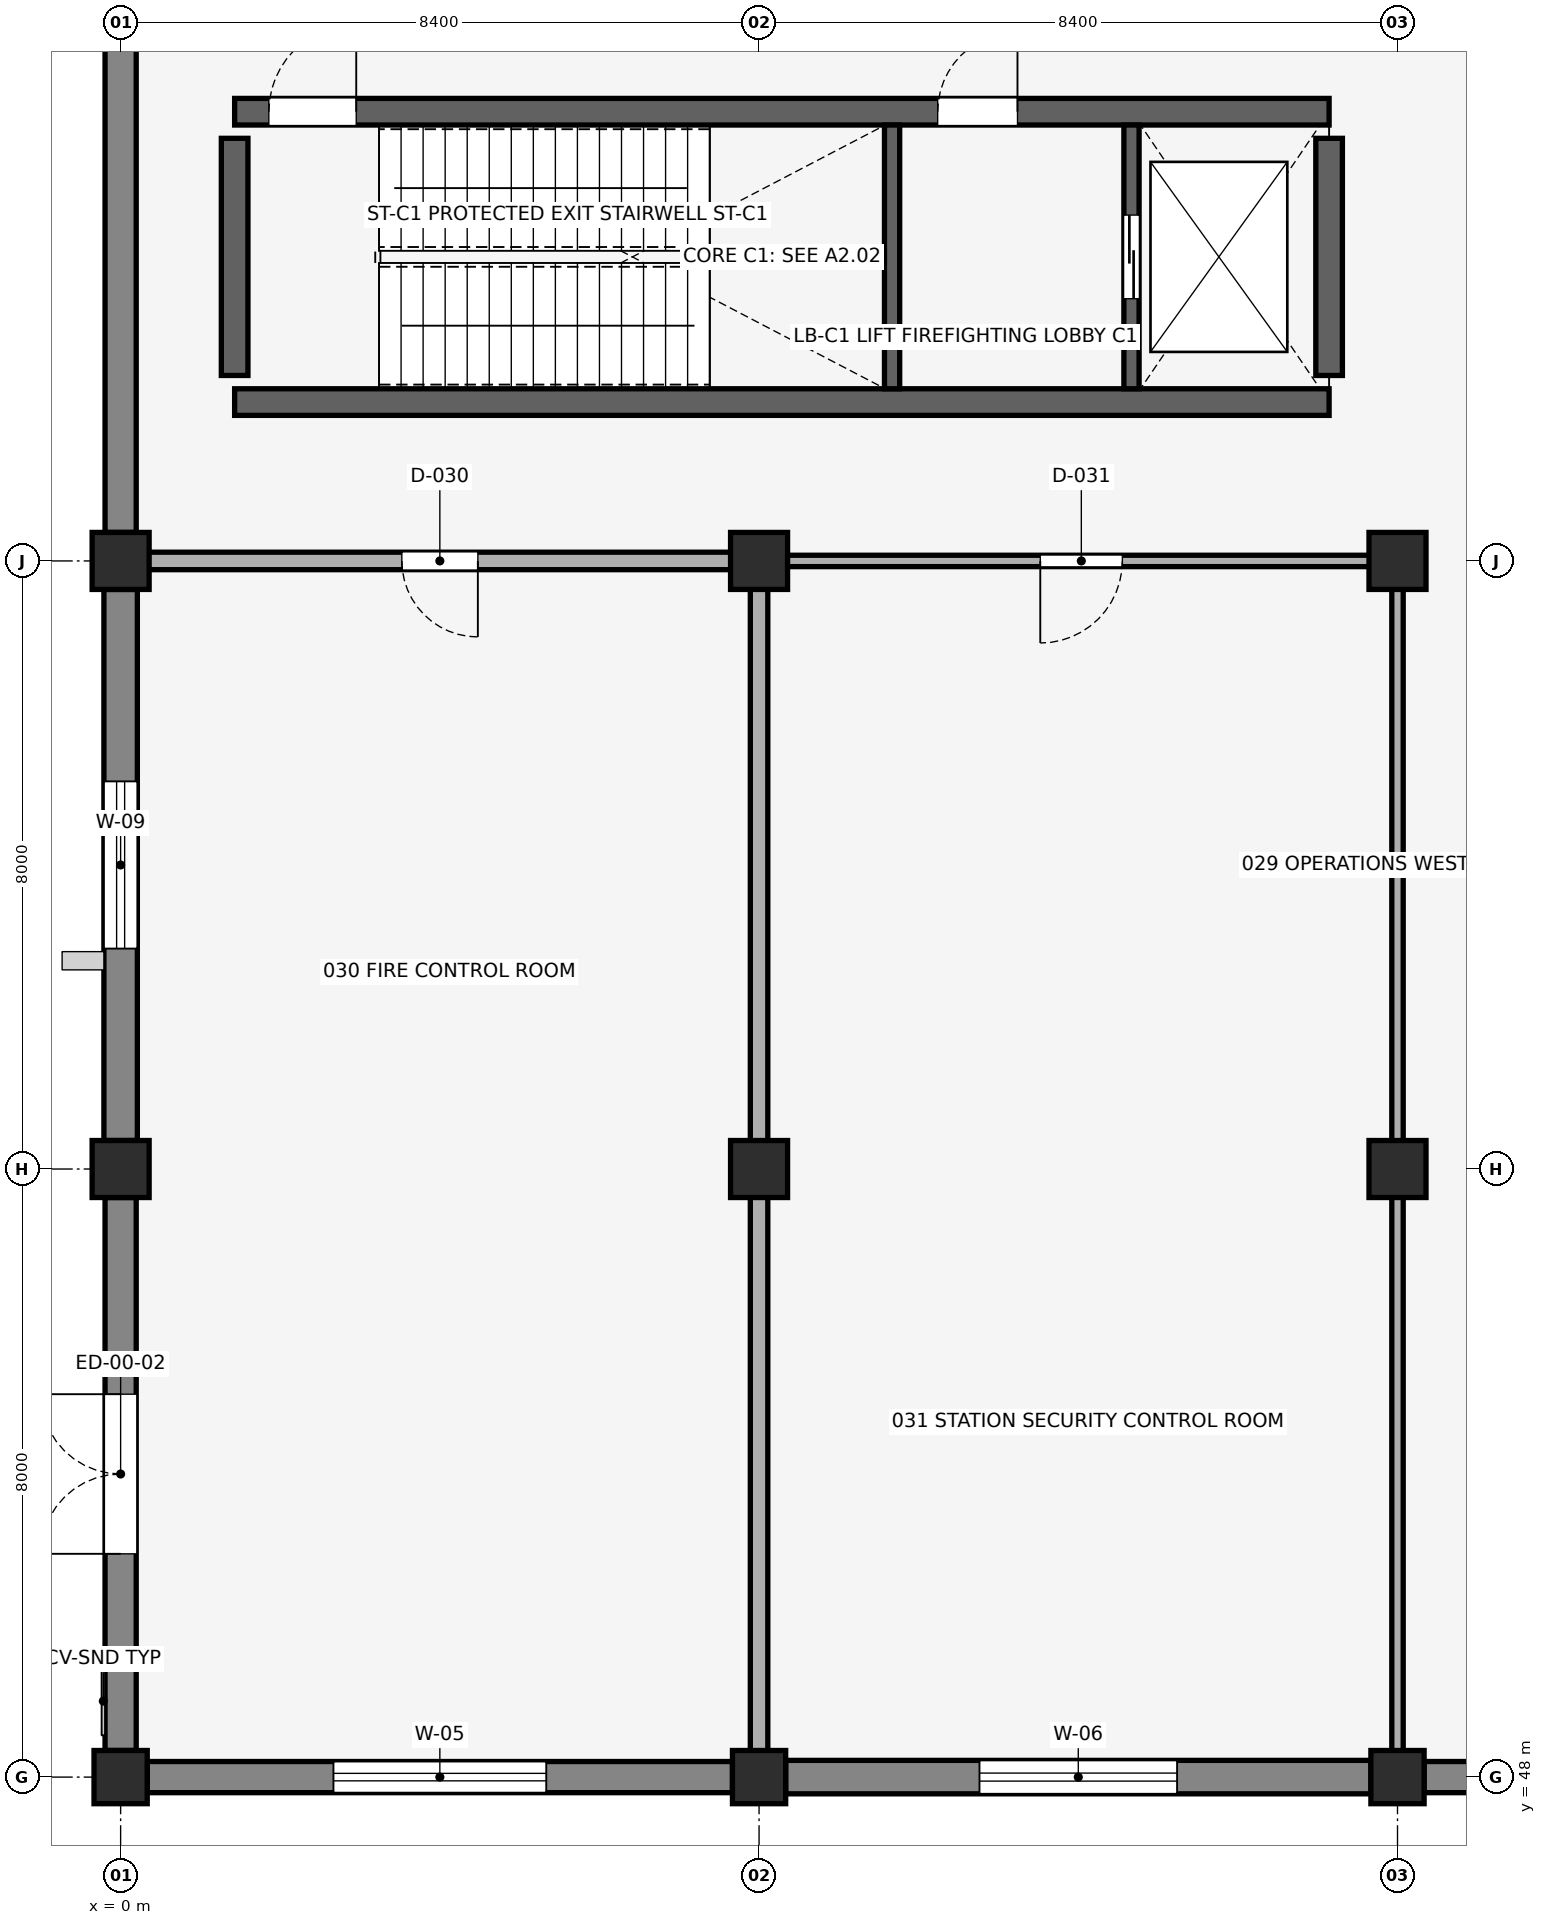
"""IFC4 building model, lengths in metres.
Left out: names, types, materials, properties, quantities, classifications, styles, units other than length and angle.
Written with IfcOpenShell. Run it as: python <this file> out.ifc"""

import sys

from ifc_helpers import new_model, si_unit, direction, frame, frame_2d, origin, origin_2d, place, context, subcontext, project, spatial, rectangle, extrude, element, fill, save


model = new_model("IFC4")
c1 = context("Model", 3, precision=1e-05, world=origin(), true_north=direction((0.0, 1.0)))
c2 = subcontext(c1, "Body", "Model", "MODEL_VIEW")
j1 = project(units=[si_unit("LENGTHUNIT", "METRE"), si_unit("PLANEANGLEUNIT", "RADIAN")], contexts=[c1])
p1 = place(None, origin())
s1 = spatial("IfcSite", under=j1, at=p1, CompositionType="ELEMENT")
p2 = place(p1, origin())
s2 = spatial("IfcBuilding", under=s1, at=p2, CompositionType="ELEMENT")
p3 = place(p2, origin())
s3 = spatial("IfcBuildingStorey", under=s2, at=p3, CompositionType="ELEMENT", Elevation=0.0)
p4 = place(p3, frame((1.5, 66.09, 0.0), z_axis=(0.0, 0.0, 1.0), x_axis=(1.0, 0.0, 0.0)))
e1 = element("IfcWall", 1, at=p4, inside=s3, PredefinedType="SHEAR", context=c2, shape_type="SweptSolid", body=[
    extrude(rectangle(XDim=14.4, YDim=0.35, at=frame_2d((7.2, 0.0))), origin(), (0.0, 0.0, 1.0), 5.15),
])
p5 = place(p3, frame((1.5, 69.91, 0.0), z_axis=(0.0, 0.0, 1.0), x_axis=(1.0, 0.0, 0.0)))
e2 = element("IfcWall", 2, at=p5, inside=s3, PredefinedType="SHEAR", context=c2, shape_type="SweptSolid", body=[
    extrude(rectangle(XDim=14.4, YDim=0.35, at=frame_2d((7.2, 0.0))), origin(), (0.0, 0.0, 1.0), 5.15),
])
p6 = place(p5, frame((0.45, 0.0, 0.0), z_axis=(0.0, 0.0, 1.0), x_axis=(1.0, 0.0, 0.0)))
e3 = element("IfcOpeningElement", 3, at=p6, cuts=e2, PredefinedType="OPENING", context=c2, shape_type="SweptSolid", body=[
    extrude(rectangle(XDim=1.15, YDim=2.15, at=frame_2d((0.575, 1.075))), frame((0.0, 0.185, 0.0), z_axis=(0.0, -1.0, 0.0), x_axis=(1.0, 0.0, 0.0)), (0.0, 0.0, 1.0), 0.37),
])
p7 = place(p5, frame((9.25, 0.0, 0.0), z_axis=(0.0, 0.0, 1.0), x_axis=(1.0, 0.0, 0.0)))
e4 = element("IfcOpeningElement", 4, at=p7, cuts=e2, PredefinedType="OPENING", context=c2, shape_type="SweptSolid", body=[
    extrude(rectangle(XDim=1.05, YDim=2.15, at=frame_2d((0.525, 1.075))), frame((0.0, 0.185, 0.0), z_axis=(0.0, -1.0, 0.0), x_axis=(1.0, 0.0, 0.0)), (0.0, 0.0, 1.0), 0.37),
])
for number, where, z_axis, x_axis in (
    (5, (1.5, 66.44, 0.0), (0.0, 0.0, 1.0), (0.0, 1.0, 0.0)),
    (6, (15.9, 66.44, 0.0), (0.0, 0.0, 1.0), (0.0, 1.0, 0.0)),
):
    element("IfcWall", number, at=place(p3, frame(where, z_axis=z_axis, x_axis=x_axis)), inside=s3, PredefinedType="SHEAR", context=c2, shape_type="SweptSolid", body=[
        extrude(rectangle(XDim=3.12, YDim=0.35, at=frame_2d((1.56, 0.0))), origin(), (0.0, 0.0, 1.0), 5.15),
    ])
p8 = place(p3, frame((0.0, 48.0, 0.0), z_axis=(0.0, 0.0, 1.0), x_axis=(1.0, 0.0, 0.0)))
e7 = element("IfcColumn", 7, at=p8, inside=s3, PredefinedType="COLUMN", context=c2, shape_type="SweptSolid", body=[
    extrude(rectangle(XDim=0.7, YDim=0.7, at=origin_2d()), origin(), (0.0, 0.0, 1.0), 5.15),
])
for number, where, z_axis, x_axis in (
    (8, (0.0, 56.0, 0.0), (0.0, 0.0, 1.0), (1.0, 0.0, 0.0)),
    (9, (0.0, 64.0, 0.0), (0.0, 0.0, 1.0), (1.0, 0.0, 0.0)),
):
    element("IfcColumn", number, at=place(p3, frame(where, z_axis=z_axis, x_axis=x_axis)), inside=s3, PredefinedType="COLUMN", context=c2, shape_type="SweptSolid", body=[
        extrude(rectangle(XDim=0.75, YDim=0.75, at=origin_2d()), origin(), (0.0, 0.0, 1.0), 5.15),
    ])
p9 = place(p3, frame((8.4, 48.0, 0.0), z_axis=(0.0, 0.0, 1.0), x_axis=(1.0, 0.0, 0.0)))
e10 = element("IfcColumn", 10, at=p9, inside=s3, PredefinedType="COLUMN", context=c2, shape_type="SweptSolid", body=[
    extrude(rectangle(XDim=0.7, YDim=0.7, at=origin_2d()), origin(), (0.0, 0.0, 1.0), 5.15),
])
for number, where, z_axis, x_axis in (
    (11, (8.4, 56.0, 0.0), (0.0, 0.0, 1.0), (1.0, 0.0, 0.0)),
    (12, (8.4, 64.0, 0.0), (0.0, 0.0, 1.0), (1.0, 0.0, 0.0)),
):
    element("IfcColumn", number, at=place(p3, frame(where, z_axis=z_axis, x_axis=x_axis)), inside=s3, PredefinedType="COLUMN", context=c2, shape_type="SweptSolid", body=[
        extrude(rectangle(XDim=0.75, YDim=0.75, at=origin_2d()), origin(), (0.0, 0.0, 1.0), 5.15),
    ])
p10 = place(p3, frame((16.8, 48.0, 0.0), z_axis=(0.0, 0.0, 1.0), x_axis=(1.0, 0.0, 0.0)))
e13 = element("IfcColumn", 13, at=p10, inside=s3, PredefinedType="COLUMN", context=c2, shape_type="SweptSolid", body=[
    extrude(rectangle(XDim=0.7, YDim=0.7, at=origin_2d()), origin(), (0.0, 0.0, 1.0), 5.15),
])
for number, where, z_axis, x_axis in (
    (14, (16.8, 56.0, 0.0), (0.0, 0.0, 1.0), (1.0, 0.0, 0.0)),
    (15, (16.8, 64.0, 0.0), (0.0, 0.0, 1.0), (1.0, 0.0, 0.0)),
):
    element("IfcColumn", number, at=place(p3, frame(where, z_axis=z_axis, x_axis=x_axis)), inside=s3, PredefinedType="COLUMN", context=c2, shape_type="SweptSolid", body=[
        extrude(rectangle(XDim=0.75, YDim=0.75, at=origin_2d()), origin(), (0.0, 0.0, 1.0), 5.15),
    ])
p11 = place(p3, frame((0.35, 48.0, 0.0), z_axis=(0.0, 0.0, 1.0), x_axis=(1.0, 0.0, 0.0)))
e16 = element("IfcWall", 16, at=p11, inside=s3, PredefinedType="SOLIDWALL", context=c2, shape_type="SweptSolid", body=[
    extrude(rectangle(XDim=7.7, YDim=0.41, at=frame_2d((3.85, 0.0))), origin(), (0.0, 0.0, 1.0), 4.74),
])
p12 = place(p11, frame((2.45, 0.0, 0.9), z_axis=(0.0, 0.0, 1.0), x_axis=(1.0, 0.0, 0.0)))
e17 = element("IfcOpeningElement", 17, at=p12, cuts=e16, PredefinedType="OPENING", context=c2, shape_type="SweptSolid", body=[
    extrude(rectangle(XDim=2.8, YDim=1.6, at=frame_2d((1.4, 0.8))), frame((0.0, 0.215, 0.0), z_axis=(0.0, -1.0, 0.0), x_axis=(1.0, 0.0, 0.0)), (0.0, 0.0, 1.0), 0.43),
])
p13 = place(p3, frame((8.75, 48.0, 0.0), z_axis=(0.0, 0.0, 1.0), x_axis=(1.0, 0.0, 0.0)))
e18 = element("IfcWall", 18, at=p13, inside=s3, PredefinedType="SOLIDWALL", context=c2, shape_type="SweptSolid", body=[
    extrude(rectangle(XDim=7.7, YDim=0.44, at=frame_2d((3.85, 0.0))), origin(), (0.0, 0.0, 1.0), 4.74),
])
p14 = place(p13, frame((2.55, 0.0, 0.9), z_axis=(0.0, 0.0, 1.0), x_axis=(1.0, 0.0, 0.0)))
e19 = element("IfcOpeningElement", 19, at=p14, cuts=e18, PredefinedType="OPENING", context=c2, shape_type="SweptSolid", body=[
    extrude(rectangle(XDim=2.6, YDim=1.8, at=frame_2d((1.3, 0.9))), frame((0.0, 0.23, 0.0), z_axis=(0.0, -1.0, 0.0), x_axis=(1.0, 0.0, 0.0)), (0.0, 0.0, 1.0), 0.46),
])
p15 = place(p3, frame((17.15, 48.0, 0.0), z_axis=(0.0, 0.0, 1.0), x_axis=(1.0, 0.0, 0.0)))
e20 = element("IfcWall", 20, at=p15, inside=s3, PredefinedType="SOLIDWALL", context=c2, shape_type="SweptSolid", body=[
    extrude(rectangle(XDim=7.7, YDim=0.41, at=frame_2d((3.85, 0.0))), origin(), (0.0, 0.0, 1.0), 4.74),
])
p16 = place(p15, frame((2.65, 0.0, 0.9), z_axis=(0.0, 0.0, 1.0), x_axis=(1.0, 0.0, 0.0)))
e21 = element("IfcOpeningElement", 21, at=p16, cuts=e20, PredefinedType="OPENING", context=c2, shape_type="SweptSolid", body=[
    extrude(rectangle(XDim=2.4, YDim=1.75, at=frame_2d((1.2, 0.875))), frame((0.0, 0.215, 0.0), z_axis=(0.0, -1.0, 0.0), x_axis=(1.0, 0.0, 0.0)), (0.0, 0.0, 1.0), 0.43),
])
p17 = place(p3, frame((0.0, 48.35, 0.0), z_axis=(0.0, 0.0, 1.0), x_axis=(0.0, 1.0, 0.0)))
e22 = element("IfcWall", 22, at=p17, inside=s3, PredefinedType="SOLIDWALL", context=c2, shape_type="SweptSolid", body=[
    extrude(rectangle(XDim=7.275, YDim=0.41, at=frame_2d((3.637, 0.0))), origin(), (0.0, 0.0, 1.0), 4.747),
])
p18 = place(p17, frame((2.587, 0.0, 0.0), z_axis=(0.0, 0.0, 1.0), x_axis=(1.0, 0.0, 0.0)))
e23 = element("IfcOpeningElement", 23, at=p18, cuts=e22, PredefinedType="OPENING", context=c2, shape_type="SweptSolid", body=[
    extrude(rectangle(XDim=2.1, YDim=2.45, at=frame_2d((1.05, 1.225))), frame((0.0, 0.215, 0.0), z_axis=(0.0, -1.0, 0.0), x_axis=(1.0, 0.0, 0.0)), (0.0, 0.0, 1.0), 0.43),
])
p19 = place(p3, frame((0.0, 56.375, 0.0), z_axis=(0.0, 0.0, 1.0), x_axis=(0.0, 1.0, 0.0)))
e24 = element("IfcWall", 24, at=p19, inside=s3, PredefinedType="SOLIDWALL", context=c2, shape_type="SweptSolid", body=[
    extrude(rectangle(XDim=7.25, YDim=0.44, at=frame_2d((3.625, 0.0))), origin(), (0.0, 0.0, 1.0), 4.747),
])
p20 = place(p19, frame((2.525, 0.0, 0.9), z_axis=(0.0, 0.0, 1.0), x_axis=(1.0, 0.0, 0.0)))
e25 = element("IfcOpeningElement", 25, at=p20, cuts=e24, PredefinedType="OPENING", context=c2, shape_type="SweptSolid", body=[
    extrude(rectangle(XDim=2.2, YDim=1.5, at=frame_2d((1.1, 0.75))), frame((0.0, 0.23, 0.0), z_axis=(0.0, -1.0, 0.0), x_axis=(1.0, 0.0, 0.0)), (0.0, 0.0, 1.0), 0.46),
])
p21 = place(p3, frame((0.0, 64.375, 0.0), z_axis=(0.0, 0.0, 1.0), x_axis=(0.0, 1.0, 0.0)))
e26 = element("IfcWall", 26, at=p21, inside=s3, PredefinedType="SOLIDWALL", context=c2, shape_type="SweptSolid", body=[
    extrude(rectangle(XDim=7.25, YDim=0.41, at=frame_2d((3.625, 0.0))), origin(), (0.0, 0.0, 1.0), 4.85),
])
p22 = place(p3, frame((10.15, 66.265, 0.0), z_axis=(0.0, 0.0, 1.0), x_axis=(0.0, 1.0, 0.0)))
e27 = element("IfcWall", 27, at=p22, inside=s3, PredefinedType="SHEAR", context=c2, shape_type="SweptSolid", body=[
    extrude(rectangle(XDim=3.47, YDim=0.2, at=frame_2d((1.735, 0.0))), origin(), (0.0, 0.0, 1.0), 5.15),
])
p23 = place(p3, frame((13.3, 66.265, 0.0), z_axis=(0.0, 0.0, 1.0), x_axis=(0.0, 1.0, 0.0)))
e28 = element("IfcWall", 28, at=p23, inside=s3, PredefinedType="SHEAR", context=c2, shape_type="SweptSolid", body=[
    extrude(rectangle(XDim=3.47, YDim=0.2, at=frame_2d((1.735, 0.0))), origin(), (0.0, 0.0, 1.0), 5.15),
])
p24 = place(p23, frame((1.185, 0.0, 0.0), z_axis=(0.0, 0.0, 1.0), x_axis=(1.0, 0.0, 0.0)))
e29 = element("IfcOpeningElement", 29, at=p24, cuts=e28, PredefinedType="OPENING", context=c2, shape_type="SweptSolid", body=[
    extrude(rectangle(XDim=1.1, YDim=2.15, at=frame_2d((0.55, 1.075))), frame((0.0, 0.11, 0.0), z_axis=(0.0, -1.0, 0.0), x_axis=(1.0, 0.0, 0.0)), (0.0, 0.0, 1.0), 0.22),
])
p25 = place(p3, frame((0.365, 64.0, 0.0), z_axis=(0.0, 0.0, 1.0), x_axis=(1.0, 0.0, 0.0)))
e30 = element("IfcWall", 30, at=p25, inside=s3, PredefinedType="PARTITIONING", context=c2, shape_type="SweptSolid", body=[
    extrude(rectangle(XDim=7.67, YDim=0.23, at=frame_2d((3.835, 0.0))), origin(), (0.0, 0.0, 1.0), 4.605),
])
p26 = place(p25, frame((4.335, 0.0, 0.0), z_axis=(0.0, 0.0, 1.0), x_axis=(-1.0, 0.0, 0.0)))
e31 = element("IfcOpeningElement", 31, at=p26, cuts=e30, PredefinedType="OPENING", context=c2, shape_type="SweptSolid", body=[
    extrude(rectangle(XDim=1.0, YDim=2.15, at=frame_2d((0.5, 1.075))), frame((0.0, 0.125, 0.0), z_axis=(0.0, -1.0, 0.0), x_axis=(1.0, 0.0, 0.0)), (0.0, 0.0, 1.0), 0.25),
])
p27 = place(p3, frame((8.765, 64.0, 0.0), z_axis=(0.0, 0.0, 1.0), x_axis=(1.0, 0.0, 0.0)))
e32 = element("IfcWall", 32, at=p27, inside=s3, PredefinedType="PARTITIONING", context=c2, shape_type="SweptSolid", body=[
    extrude(rectangle(XDim=7.67, YDim=0.15, at=frame_2d((3.835, 0.0))), origin(), (0.0, 0.0, 1.0), 4.605),
])
p28 = place(p27, frame((4.415, 0.0, 0.0), z_axis=(0.0, 0.0, 1.0), x_axis=(-1.0, 0.0, 0.0)))
e33 = element("IfcOpeningElement", 33, at=p28, cuts=e32, PredefinedType="OPENING", context=c2, shape_type="SweptSolid", body=[
    extrude(rectangle(XDim=1.08, YDim=2.18, at=frame_2d((0.54, 1.09))), frame((0.0, 0.085, 0.0), z_axis=(0.0, -1.0, 0.0), x_axis=(1.0, 0.0, 0.0)), (0.0, 0.0, 1.0), 0.17),
])
p29 = place(p3, frame((8.4, 48.34, 0.0), z_axis=(0.0, 0.0, 1.0), x_axis=(0.0, 1.0, 0.0)))
e34 = element("IfcWall", 34, at=p29, inside=s3, PredefinedType="PARTITIONING", context=c2, shape_type="SweptSolid", body=[
    extrude(rectangle(XDim=7.295, YDim=0.23, at=frame_2d((3.647, 0.0))), origin(), (0.0, 0.0, 1.0), 4.542),
])
p30 = place(p3, frame((8.4, 56.365, 0.0), z_axis=(0.0, 0.0, 1.0), x_axis=(0.0, 1.0, 0.0)))
e35 = element("IfcWall", 35, at=p30, inside=s3, PredefinedType="PARTITIONING", context=c2, shape_type="SweptSolid", body=[
    extrude(rectangle(XDim=7.27, YDim=0.23, at=frame_2d((3.635, 0.0))), origin(), (0.0, 0.0, 1.0), 4.542),
])
p31 = place(p3, frame((16.8, 48.34, 0.0), z_axis=(0.0, 0.0, 1.0), x_axis=(0.0, 1.0, 0.0)))
e36 = element("IfcWall", 36, at=p31, inside=s3, PredefinedType="PARTITIONING", context=c2, shape_type="SweptSolid", body=[
    extrude(rectangle(XDim=7.295, YDim=0.15, at=frame_2d((3.647, 0.0))), origin(), (0.0, 0.0, 1.0), 4.542),
])
p32 = place(p3, frame((16.8, 56.365, 0.0), z_axis=(0.0, 0.0, 1.0), x_axis=(0.0, 1.0, 0.0)))
e37 = element("IfcWall", 37, at=p32, inside=s3, PredefinedType="PARTITIONING", context=c2, shape_type="SweptSolid", body=[
    extrude(rectangle(XDim=7.27, YDim=0.15, at=frame_2d((3.635, 0.0))), origin(), (0.0, 0.0, 1.0), 4.542),
])
p33 = place(p12, origin())
e38 = element("IfcWindow", 38, at=p33, inside=s3, PartitioningType="DOUBLE_PANEL_VERTICAL", PredefinedType="WINDOW", context=c2, shape_type="SweptSolid", body=[
    extrude(rectangle(XDim=2.8, YDim=1.6, at=frame_2d((1.4, 0.8))), frame((0.0, 0.03, 0.0), z_axis=(0.0, -1.0, 0.0), x_axis=(1.0, 0.0, 0.0)), (0.0, 0.0, 1.0), 0.06),
])
fill(e17, e38)
p34 = place(p14, origin())
e39 = element("IfcWindow", 39, at=p34, inside=s3, PartitioningType="DOUBLE_PANEL_VERTICAL", PredefinedType="WINDOW", context=c2, shape_type="SweptSolid", body=[
    extrude(rectangle(XDim=2.6, YDim=1.8, at=frame_2d((1.3, 0.9))), frame((0.0, 0.03, 0.0), z_axis=(0.0, -1.0, 0.0), x_axis=(1.0, 0.0, 0.0)), (0.0, 0.0, 1.0), 0.06),
])
fill(e19, e39)
p35 = place(p18, origin())
e40 = element("IfcDoor", 40, at=p35, inside=s3, OperationType="DOUBLE_DOOR_SINGLE_SWING", PredefinedType="DOOR", context=c2, shape_type="SweptSolid", body=[
    extrude(rectangle(XDim=2.1, YDim=2.45, at=frame_2d((1.05, 1.225))), frame((0.0, 0.025, 0.0), z_axis=(0.0, -1.0, 0.0), x_axis=(1.0, 0.0, 0.0)), (0.0, 0.0, 1.0), 0.05),
])
fill(e23, e40)
p36 = place(p20, origin())
e41 = element("IfcWindow", 41, at=p36, inside=s3, PartitioningType="DOUBLE_PANEL_VERTICAL", PredefinedType="WINDOW", context=c2, shape_type="SweptSolid", body=[
    extrude(rectangle(XDim=2.2, YDim=1.5, at=frame_2d((1.1, 0.75))), frame((0.0, 0.03, 0.0), z_axis=(0.0, -1.0, 0.0), x_axis=(1.0, 0.0, 0.0)), (0.0, 0.0, 1.0), 0.06),
])
fill(e25, e41)
p37 = place(p6, origin())
e42 = element("IfcDoor", 42, at=p37, inside=s3, OperationType="SINGLE_SWING_RIGHT", PredefinedType="DOOR", context=c2, shape_type="SweptSolid", body=[
    extrude(rectangle(XDim=1.15, YDim=2.15, at=frame_2d((0.575, 1.075))), frame((0.0, 0.025, 0.0), z_axis=(0.0, -1.0, 0.0), x_axis=(1.0, 0.0, 0.0)), (0.0, 0.0, 1.0), 0.05),
])
fill(e3, e42)
p38 = place(p7, origin())
e43 = element("IfcDoor", 43, at=p38, inside=s3, OperationType="SINGLE_SWING_RIGHT", PredefinedType="DOOR", context=c2, shape_type="SweptSolid", body=[
    extrude(rectangle(XDim=1.05, YDim=2.15, at=frame_2d((0.525, 1.075))), frame((0.0, 0.025, 0.0), z_axis=(0.0, -1.0, 0.0), x_axis=(1.0, 0.0, 0.0)), (0.0, 0.0, 1.0), 0.05),
])
fill(e4, e43)
p39 = place(p24, origin())
e44 = element("IfcDoor", 44, at=p39, inside=s3, OperationType="DOUBLE_DOOR_SLIDING", PredefinedType="DOOR", context=c2, shape_type="SweptSolid", body=[
    extrude(rectangle(XDim=1.1, YDim=2.15, at=frame_2d((0.55, 1.075))), frame((0.0, 0.025, 0.0), z_axis=(0.0, -1.0, 0.0), x_axis=(1.0, 0.0, 0.0)), (0.0, 0.0, 1.0), 0.05),
])
fill(e29, e44)
p40 = place(p26, origin())
e45 = element("IfcDoor", 45, at=p40, inside=s3, OperationType="SINGLE_SWING_LEFT", PredefinedType="DOOR", context=c2, shape_type="SweptSolid", body=[
    extrude(rectangle(XDim=1.0, YDim=2.15, at=frame_2d((0.5, 1.075))), frame((0.0, 0.025, 0.0), z_axis=(0.0, -1.0, 0.0), x_axis=(1.0, 0.0, 0.0)), (0.0, 0.0, 1.0), 0.05),
])
fill(e31, e45)
p41 = place(p28, origin())
e46 = element("IfcDoor", 46, at=p41, inside=s3, OperationType="SINGLE_SWING_RIGHT", PredefinedType="DOOR", context=c2, shape_type="SweptSolid", body=[
    extrude(rectangle(XDim=1.08, YDim=2.18, at=frame_2d((0.54, 1.09))), frame((0.0, 0.025, 0.0), z_axis=(0.0, -1.0, 0.0), x_axis=(1.0, 0.0, 0.0)), (0.0, 0.0, 1.0), 0.05),
])
fill(e33, e46)
save(model, sys.argv[1])
